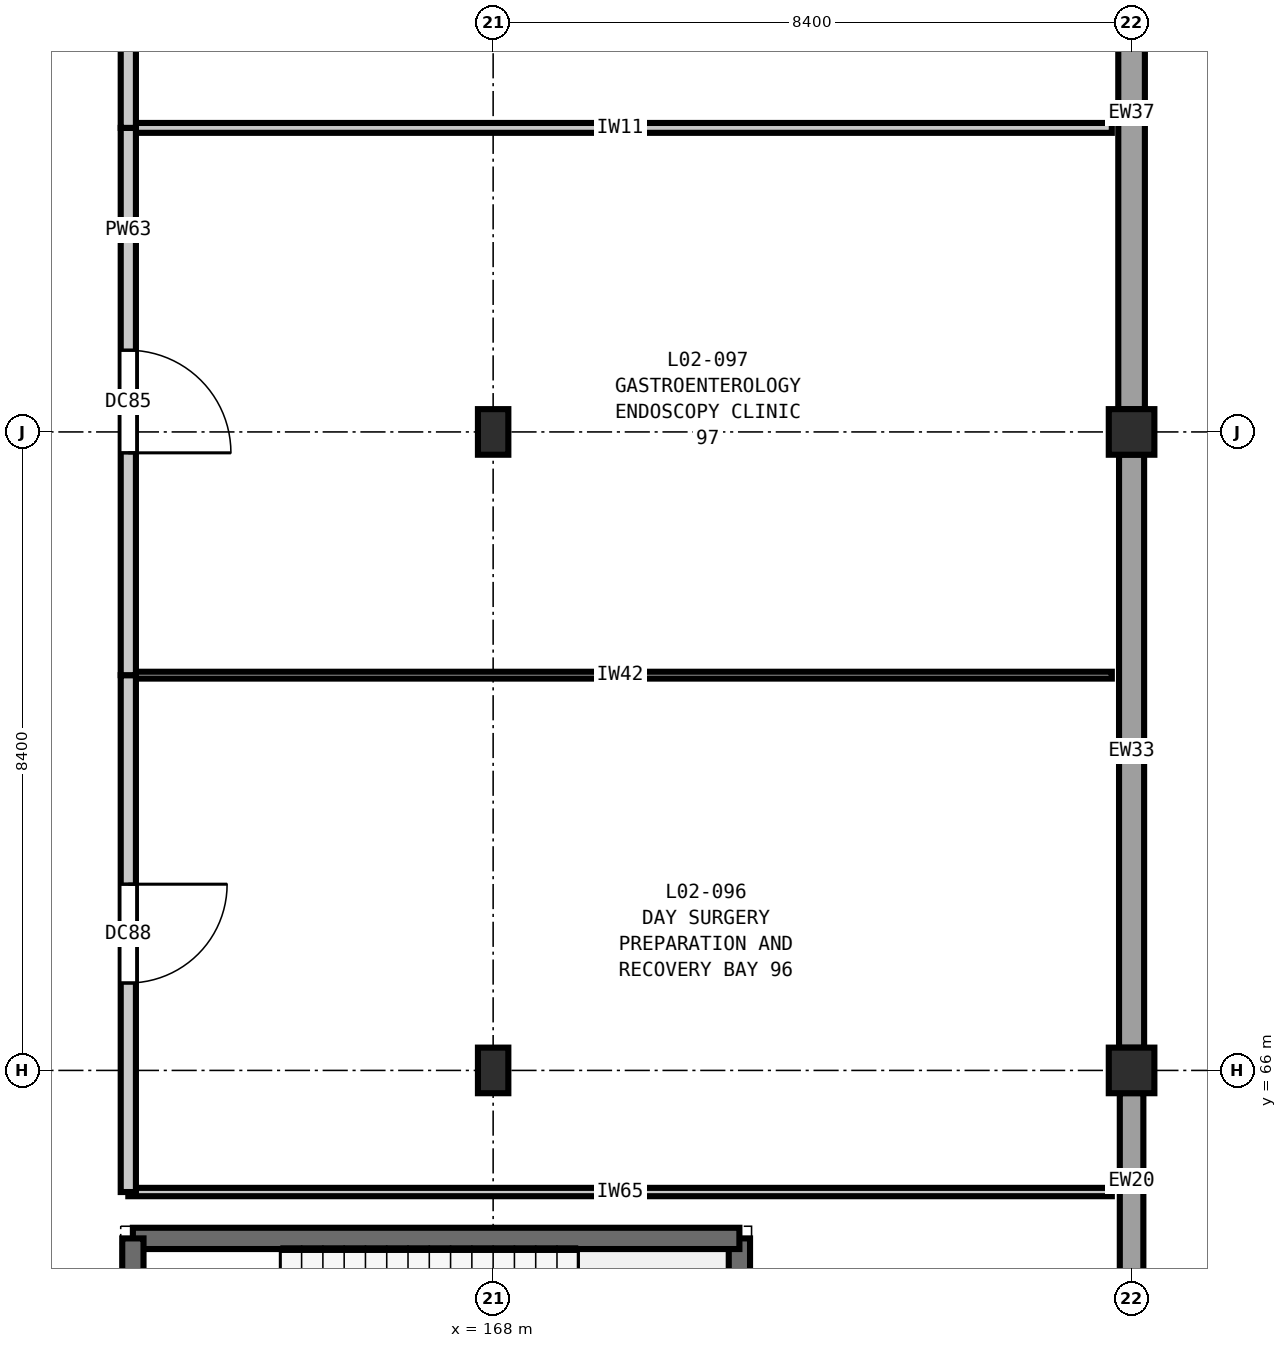
"""IFC4 building model, lengths in metres.
Left out: names, types, materials, properties, quantities, classifications, styles, units other than length and angle.
Written with IfcOpenShell. Run it as: python <this file> out.ifc"""

import sys

from ifc_helpers import new_model, si_unit, direction, frame, frame_2d, origin, origin_2d, place, context, subcontext, project, spatial, rectangle, extrude, element, fill, save


model = new_model("IFC4")
c1 = context("Model", 3, precision=1e-05, world=origin(), true_north=direction((0.0, 1.0)))
c2 = subcontext(c1, "Body", "Model", "MODEL_VIEW")
j1 = project(units=[si_unit("LENGTHUNIT", "METRE"), si_unit("PLANEANGLEUNIT", "RADIAN")], contexts=[c1])
p1 = place(None, origin())
s1 = spatial("IfcSite", under=j1, at=p1, CompositionType="ELEMENT")
p2 = place(p1, origin())
s2 = spatial("IfcBuilding", under=s1, at=p2, CompositionType="ELEMENT")
p3 = place(p2, frame((0.0, 0.0, 10.8)))
s3 = spatial("IfcBuildingStorey", under=s2, at=p3, CompositionType="ELEMENT", Elevation=10.8)
for number, where, z_axis, x_axis in (
    (1, (168.0, 66.0, 0.0), (0.0, 0.0, 1.0), (1.0, 0.0, 0.0)),
    (2, (168.0, 74.4, 0.0), (0.0, 0.0, 1.0), (1.0, 0.0, 0.0)),
):
    element("IfcColumn", number, at=place(p3, frame(where, z_axis=z_axis, x_axis=x_axis)), inside=s3, PredefinedType="COLUMN", context=c2, shape_type="SweptSolid", body=[
        extrude(rectangle(XDim=0.4, YDim=0.6, at=origin_2d()), origin(), (0.0, 0.0, 1.0), 5.4),
    ])
for number, where, z_axis, x_axis in (
    (3, (176.4, 66.0, 0.0), (0.0, 0.0, 1.0), (1.0, 0.0, 0.0)),
    (4, (176.4, 74.4, 0.0), (0.0, 0.0, 1.0), (1.0, 0.0, 0.0)),
):
    element("IfcColumn", number, at=place(p3, frame(where, z_axis=z_axis, x_axis=x_axis)), inside=s3, PredefinedType="COLUMN", context=c2, shape_type="SweptSolid", body=[
        extrude(rectangle(XDim=0.6, YDim=0.6, at=origin_2d()), origin(), (0.0, 0.0, 1.0), 5.4),
    ])
p4 = place(p3, frame((176.4, 82.502, 0.0), z_axis=(0.0, 0.0, 1.0), x_axis=(0.0, -1.0, 0.0)))
e5 = element("IfcWall", 5, at=p4, inside=s3, PredefinedType="SOLIDWALL", context=c2, shape_type="SweptSolid", body=[
    extrude(rectangle(XDim=7.804, YDim=0.35, at=frame_2d((3.902, 0.0))), origin(), (0.0, 0.0, 1.0), 4.68),
])
p5 = place(p3, frame((176.4, 74.102, 0.0), z_axis=(0.0, 0.0, 1.0), x_axis=(0.0, -1.0, 0.0)))
e6 = element("IfcWall", 6, at=p5, inside=s3, PredefinedType="SOLIDWALL", context=c2, shape_type="SweptSolid", body=[
    extrude(rectangle(XDim=7.804, YDim=0.33, at=frame_2d((3.902, 0.0))), origin(), (0.0, 0.0, 1.0), 4.68),
])
p6 = place(p3, frame((176.4, 65.702, 0.0), z_axis=(0.0, 0.0, 1.0), x_axis=(0.0, -1.0, 0.0)))
e7 = element("IfcWall", 7, at=p6, inside=s3, PredefinedType="SOLIDWALL", context=c2, shape_type="SweptSolid", body=[
    extrude(rectangle(XDim=7.804, YDim=0.31, at=frame_2d((3.902, 0.0))), origin(), (0.0, 0.0, 1.0), 4.68),
])
p7 = place(p6, frame((2.552, 0.0, 0.9)))
e8 = element("IfcOpeningElement", 8, at=p7, cuts=e7, PredefinedType="OPENING", context=c2, shape_type="SweptSolid", body=[
    extrude(rectangle(XDim=2.7, YDim=2.15, at=frame_2d((1.35, 1.075))), frame((0.0, 0.165, 0.0), z_axis=(0.0, -1.0, 0.0), x_axis=(1.0, 0.0, 0.0)), (0.0, 0.0, 1.0), 0.33),
])
p8 = place(p3, frame((171.24, 59.71, 0.0), z_axis=(0.0, 0.0, 1.0), x_axis=(0.0, 1.0, 0.0)))
e9 = element("IfcWall", 9, at=p8, inside=s3, PredefinedType="SHEAR", context=c2, shape_type="SweptSolid", body=[
    extrude(rectangle(XDim=4.08, YDim=0.28, at=frame_2d((2.04, 0.0))), origin(), (0.0, 0.0, 1.0), 5.4),
])
p9 = place(p3, frame((171.24, 63.79, 0.0), z_axis=(0.0, 0.0, 1.0), x_axis=(-1.0, 0.0, 0.0)))
e10 = element("IfcWall", 10, at=p9, inside=s3, PredefinedType="SHEAR", context=c2, shape_type="SweptSolid", body=[
    extrude(rectangle(XDim=7.98, YDim=0.28, at=frame_2d((3.99, 0.0))), origin(), (0.0, 0.0, 1.0), 5.4),
])
p10 = place(p3, frame((163.26, 63.79, 0.0), z_axis=(0.0, 0.0, 1.0), x_axis=(0.0, -1.0, 0.0)))
e11 = element("IfcWall", 11, at=p10, inside=s3, PredefinedType="SHEAR", context=c2, shape_type="SweptSolid", body=[
    extrude(rectangle(XDim=4.08, YDim=0.28, at=frame_2d((2.04, 0.0))), origin(), (0.0, 0.0, 1.0), 5.4),
])
p11 = place(p10, frame((1.34, 0.0, 0.0)))
e12 = element("IfcOpeningElement", 12, at=p11, cuts=e11, PredefinedType="OPENING", context=c2, shape_type="SweptSolid", body=[
    extrude(rectangle(XDim=1.4, YDim=2.2, at=frame_2d((0.7, 1.1))), frame((0.0, 0.15, 0.0), z_axis=(0.0, -1.0, 0.0), x_axis=(1.0, 0.0, 0.0)), (0.0, 0.0, 1.0), 0.3),
])
p12 = place(p3, frame((163.2, 64.4, 0.0), z_axis=(0.0, 0.0, 1.0), x_axis=(1.0, 0.0, 0.0)))
e13 = element("IfcWall", 13, at=p12, inside=s3, PredefinedType="PARTITIONING", context=c2, shape_type="SweptSolid", body=[
    extrude(rectangle(XDim=12.94, YDim=0.11, at=frame_2d((6.47, 0.0))), origin(), (0.0, 0.0, 1.0), 5.07),
])
p13 = place(p3, frame((163.2, 71.2, 0.0), z_axis=(0.0, 0.0, 1.0), x_axis=(1.0, 0.0, 0.0)))
e14 = element("IfcWall", 14, at=p13, inside=s3, PredefinedType="PARTITIONING", context=c2, shape_type="SweptSolid", body=[
    extrude(rectangle(XDim=12.94, YDim=0.09, at=frame_2d((6.47, 0.0))), origin(), (0.0, 0.0, 1.0), 5.07),
])
p14 = place(p3, frame((163.2, 78.4, 0.0), z_axis=(0.0, 0.0, 1.0), x_axis=(1.0, 0.0, 0.0)))
e15 = element("IfcWall", 15, at=p14, inside=s3, PredefinedType="PARTITIONING", context=c2, shape_type="SweptSolid", body=[
    extrude(rectangle(XDim=12.94, YDim=0.13, at=frame_2d((6.47, 0.0))), origin(), (0.0, 0.0, 1.0), 5.07),
])
p15 = place(p3, frame((163.2, 64.4, 0.0), z_axis=(0.0, 0.0, 1.0), x_axis=(0.0, 1.0, 0.0)))
e16 = element("IfcWall", 16, at=p15, inside=s3, PredefinedType="PARTITIONING", context=c2, shape_type="SweptSolid", body=[
    extrude(rectangle(XDim=6.8, YDim=0.2, at=frame_2d((3.4, 0.0))), origin(), (0.0, 0.0, 1.0), 5.07),
])
p16 = place(p15, frame((2.75, 0.0, 0.0)))
e17 = element("IfcOpeningElement", 17, at=p16, cuts=e16, PredefinedType="OPENING", context=c2, shape_type="SweptSolid", body=[
    extrude(rectangle(XDim=1.3, YDim=2.2, at=frame_2d((0.65, 1.1))), frame((0.0, 0.11, 0.0), z_axis=(0.0, -1.0, 0.0), x_axis=(1.0, 0.0, 0.0)), (0.0, 0.0, 1.0), 0.22),
])
p17 = place(p3, frame((163.2, 71.2, 0.0), z_axis=(0.0, 0.0, 1.0), x_axis=(0.0, 1.0, 0.0)))
e18 = element("IfcWall", 18, at=p17, inside=s3, PredefinedType="PARTITIONING", context=c2, shape_type="SweptSolid", body=[
    extrude(rectangle(XDim=7.2, YDim=0.2, at=frame_2d((3.6, 0.0))), origin(), (0.0, 0.0, 1.0), 5.07),
])
p18 = place(p17, frame((2.925, 0.0, 0.0)))
e19 = element("IfcOpeningElement", 19, at=p18, cuts=e18, PredefinedType="OPENING", context=c2, shape_type="SweptSolid", body=[
    extrude(rectangle(XDim=1.35, YDim=2.2, at=frame_2d((0.675, 1.1))), frame((0.0, 0.11, 0.0), z_axis=(0.0, -1.0, 0.0), x_axis=(1.0, 0.0, 0.0)), (0.0, 0.0, 1.0), 0.22),
])
p19 = place(p3, frame((163.2, 78.4, 0.0), z_axis=(0.0, 0.0, 1.0), x_axis=(0.0, 1.0, 0.0)))
e20 = element("IfcWall", 20, at=p19, inside=s3, PredefinedType="PARTITIONING", context=c2, shape_type="SweptSolid", body=[
    extrude(rectangle(XDim=4.4, YDim=0.2, at=frame_2d((2.2, 0.0))), origin(), (0.0, 0.0, 1.0), 5.07),
])
p20 = place(p19, frame((1.475, 0.0, 0.0)))
e21 = element("IfcOpeningElement", 21, at=p20, cuts=e20, PredefinedType="OPENING", context=c2, shape_type="SweptSolid", body=[
    extrude(rectangle(XDim=1.45, YDim=2.25, at=frame_2d((0.725, 1.125))), frame((0.0, 0.11, 0.0), z_axis=(0.0, -1.0, 0.0), x_axis=(1.0, 0.0, 0.0)), (0.0, 0.0, 1.0), 0.22),
])
p21 = place(p16, frame((1.3, 0.0, 0.0), z_axis=(0.0, 0.0, 1.0), x_axis=(-1.0, 0.0, 0.0)))
e22 = element("IfcDoor", 22, at=p21, inside=s3, OperationType="SINGLE_SWING_LEFT", PredefinedType="DOOR", context=c2, shape_type="SweptSolid", body=[
    extrude(rectangle(XDim=1.3, YDim=2.2, at=frame_2d((0.65, 1.1))), frame((0.0, 0.025, 0.0), z_axis=(0.0, -1.0, 0.0), x_axis=(1.0, 0.0, 0.0)), (0.0, 0.0, 1.0), 0.05),
])
fill(e17, e22)
p22 = place(p18, frame((1.35, 0.0, 0.0), z_axis=(0.0, 0.0, 1.0), x_axis=(-1.0, 0.0, 0.0)))
e23 = element("IfcDoor", 23, at=p22, inside=s3, OperationType="SINGLE_SWING_RIGHT", PredefinedType="DOOR", context=c2, shape_type="SweptSolid", body=[
    extrude(rectangle(XDim=1.35, YDim=2.2, at=frame_2d((0.675, 1.1))), frame((0.0, 0.025, 0.0), z_axis=(0.0, -1.0, 0.0), x_axis=(1.0, 0.0, 0.0)), (0.0, 0.0, 1.0), 0.05),
])
fill(e19, e23)
save(model, sys.argv[1])
